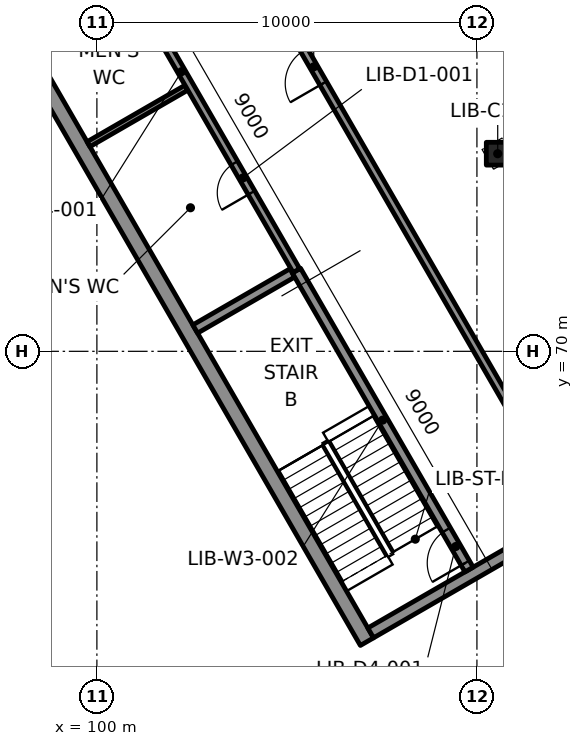
"""IFC4 building model, lengths in metres.
Left out: names, types, materials, properties, quantities, classifications, styles, units other than length and angle.
Written with IfcOpenShell. Run it as: python <this file> out.ifc"""

import sys

from ifc_helpers import new_model, si_unit, direction, frame, frame_2d, origin, origin_2d, place, context, subcontext, project, spatial, rectangle, extrude, element, fill, save


model = new_model("IFC4")
c1 = context("Model", 3, precision=1e-05, world=origin(), true_north=direction((0.0, 1.0)))
c2 = subcontext(c1, "Body", "Model", "MODEL_VIEW")
j1 = project(units=[si_unit("LENGTHUNIT", "METRE"), si_unit("PLANEANGLEUNIT", "RADIAN")], contexts=[c1])
p1 = place(None, origin())
s1 = spatial("IfcSite", under=j1, at=p1, CompositionType="ELEMENT")
p2 = place(p1, origin())
s2 = spatial("IfcBuilding", under=s1, at=p2, CompositionType="ELEMENT")
p3 = place(p2, frame((0.0, 0.0, 17.2)))
s3 = spatial("IfcBuildingStorey", under=s2, at=p3, CompositionType="ELEMENT", Elevation=17.2)
p4 = place(p3, frame((101.821, 68.315, -0.0), z_axis=(0.0, 0.0, 1.0), x_axis=(-0.5, 0.866025403784, 0.0)))
e1 = element("IfcColumn", 1, at=p4, inside=s3, PredefinedType="COLUMN", context=c2, shape_type="SweptSolid", body=[
    extrude(rectangle(XDim=1.2, YDim=1.5, at=origin_2d()), origin(), (0.0, 0.0, 1.0), 4.6),
])
p5 = place(p3, frame((103.019, 59.863, 0.0), z_axis=(0.0, 0.0, 1.0), x_axis=(-0.866027754727, 0.499995928025, 0.0)))
e2 = element("IfcWall", 2, at=p5, inside=s3, PredefinedType="PARTITIONING", context=c2, shape_type="SweptSolid", body=[
    extrude(rectangle(XDim=13.214, YDim=0.15, at=frame_2d((6.607, 0.0))), origin(), (0.0, 0.0, 1.0), 3.7),
])
p6 = place(p3, frame((110.547, 75.2, -0.36), z_axis=(0.0, 0.0, 1.0), x_axis=(1.0, 0.0, 0.0)))
e3 = element("IfcColumn", 3, at=p6, inside=s3, PredefinedType="COLUMN", context=c2, shape_type="SweptSolid", body=[
    extrude(rectangle(XDim=0.6, YDim=0.6, at=origin_2d()), origin(), (0.0, 0.0, 1.0), 4.6),
])
p7 = place(p3, frame((107.106, 62.36, 0.0), z_axis=(0.0, 0.0, 1.0), x_axis=(-0.49999992739, 0.866025445706, 0.0)))
e4 = element("IfcWall", 4, at=p7, inside=s3, PredefinedType="SOLIDWALL", context=c2, shape_type="SweptSolid", body=[
    extrude(rectangle(XDim=54.0, YDim=0.4, at=frame_2d((27.0, 0.0))), origin(), (0.0, 0.0, 1.0), 4.24),
])
p8 = place(p3, frame((132.784, 77.185, 0.0), z_axis=(0.0, 0.0, 1.0), x_axis=(-0.49999992739, 0.866025445706, 0.0)))
e5 = element("IfcWall", 5, at=p8, inside=s3, PredefinedType="SOLIDWALL", context=c2, shape_type="SweptSolid", body=[
    extrude(rectangle(XDim=54.0, YDim=0.3, at=frame_2d((27.0, 0.0))), origin(), (0.0, 0.0, 1.0), 4.24),
])
p9 = place(p8, frame((1.9, 0.0, 0.9)))
e6 = element("IfcOpeningElement", 6, at=p9, cuts=e5, PredefinedType="OPENING", context=c2, shape_type="SweptSolid", body=[
    extrude(rectangle(XDim=1.8, YDim=2.4, at=frame_2d((0.9, 1.2))), frame((0.0, 0.16, 0.0), z_axis=(0.0, -1.0, 0.0), x_axis=(1.0, 0.0, 0.0)), (0.0, 0.0, 1.0), 0.32),
])
p10 = place(p8, frame((6.3, 0.0, 0.9)))
e7 = element("IfcOpeningElement", 7, at=p10, cuts=e5, PredefinedType="OPENING", context=c2, shape_type="SweptSolid", body=[
    extrude(rectangle(XDim=1.8, YDim=2.4, at=frame_2d((0.9, 1.2))), frame((0.0, 0.16, 0.0), z_axis=(0.0, -1.0, 0.0), x_axis=(1.0, 0.0, 0.0)), (0.0, 0.0, 1.0), 0.32),
])
p11 = place(p8, frame((10.7, 0.0, 0.9)))
e8 = element("IfcOpeningElement", 8, at=p11, cuts=e5, PredefinedType="OPENING", context=c2, shape_type="SweptSolid", body=[
    extrude(rectangle(XDim=1.8, YDim=2.4, at=frame_2d((0.9, 1.2))), frame((0.0, 0.16, 0.0), z_axis=(0.0, -1.0, 0.0), x_axis=(1.0, 0.0, 0.0)), (0.0, 0.0, 1.0), 0.32),
])
p12 = place(p8, frame((15.1, 0.0, 0.9)))
e9 = element("IfcOpeningElement", 9, at=p12, cuts=e5, PredefinedType="OPENING", context=c2, shape_type="SweptSolid", body=[
    extrude(rectangle(XDim=1.8, YDim=2.4, at=frame_2d((0.9, 1.2))), frame((0.0, 0.16, 0.0), z_axis=(0.0, -1.0, 0.0), x_axis=(1.0, 0.0, 0.0)), (0.0, 0.0, 1.0), 0.32),
])
p13 = place(p8, frame((19.5, 0.0, 0.9)))
e10 = element("IfcOpeningElement", 10, at=p13, cuts=e5, PredefinedType="OPENING", context=c2, shape_type="SweptSolid", body=[
    extrude(rectangle(XDim=1.8, YDim=2.4, at=frame_2d((0.9, 1.2))), frame((0.0, 0.16, 0.0), z_axis=(0.0, -1.0, 0.0), x_axis=(1.0, 0.0, 0.0)), (0.0, 0.0, 1.0), 0.32),
])
p14 = place(p8, frame((23.9, 0.0, 0.9)))
e11 = element("IfcOpeningElement", 11, at=p14, cuts=e5, PredefinedType="OPENING", context=c2, shape_type="SweptSolid", body=[
    extrude(rectangle(XDim=1.8, YDim=2.4, at=frame_2d((0.9, 1.2))), frame((0.0, 0.16, 0.0), z_axis=(0.0, -1.0, 0.0), x_axis=(1.0, 0.0, 0.0)), (0.0, 0.0, 1.0), 0.32),
])
p15 = place(p8, frame((28.3, 0.0, 0.9)))
e12 = element("IfcOpeningElement", 12, at=p15, cuts=e5, PredefinedType="OPENING", context=c2, shape_type="SweptSolid", body=[
    extrude(rectangle(XDim=1.8, YDim=2.4, at=frame_2d((0.9, 1.2))), frame((0.0, 0.16, 0.0), z_axis=(0.0, -1.0, 0.0), x_axis=(1.0, 0.0, 0.0)), (0.0, 0.0, 1.0), 0.32),
])
p16 = place(p8, frame((32.7, 0.0, 0.9)))
e13 = element("IfcOpeningElement", 13, at=p16, cuts=e5, PredefinedType="OPENING", context=c2, shape_type="SweptSolid", body=[
    extrude(rectangle(XDim=1.8, YDim=2.4, at=frame_2d((0.9, 1.2))), frame((0.0, 0.16, 0.0), z_axis=(0.0, -1.0, 0.0), x_axis=(1.0, 0.0, 0.0)), (0.0, 0.0, 1.0), 0.32),
])
p17 = place(p8, frame((37.1, 0.0, 0.9)))
e14 = element("IfcOpeningElement", 14, at=p17, cuts=e5, PredefinedType="OPENING", context=c2, shape_type="SweptSolid", body=[
    extrude(rectangle(XDim=1.8, YDim=2.4, at=frame_2d((0.9, 1.2))), frame((0.0, 0.16, 0.0), z_axis=(0.0, -1.0, 0.0), x_axis=(1.0, 0.0, 0.0)), (0.0, 0.0, 1.0), 0.32),
])
p18 = place(p8, frame((50.3, 0.0, 0.9)))
e15 = element("IfcOpeningElement", 15, at=p18, cuts=e5, PredefinedType="OPENING", context=c2, shape_type="SweptSolid", body=[
    extrude(rectangle(XDim=1.8, YDim=2.4, at=frame_2d((0.9, 1.2))), frame((0.0, 0.16, 0.0), z_axis=(0.0, -1.0, 0.0), x_axis=(1.0, 0.0, 0.0)), (0.0, 0.0, 1.0), 0.32),
])
p19 = place(p3, frame((107.204, 62.59, 0.0), z_axis=(0.0, 0.0, 1.0), x_axis=(0.866045472092, 0.499965239061, 0.0)))
e16 = element("IfcWall", 16, at=p19, inside=s3, PredefinedType="SOLIDWALL", context=c2, shape_type="SweptSolid", body=[
    extrude(rectangle(XDim=5.6, YDim=0.3, at=frame_2d((2.8, 0.0))), origin(), (0.0, 0.0, 1.0), 4.24),
])
p20 = place(p3, frame((102.587, 70.587, 0.0), z_axis=(0.0, 0.0, 1.0), x_axis=(0.866039495442, 0.49997559174, 0.0)))
e17 = element("IfcWall", 17, at=p20, inside=s3, PredefinedType="SOLIDWALL", context=c2, shape_type="SweptSolid", body=[
    extrude(rectangle(XDim=2.95, YDim=0.25, at=frame_2d((1.475, 0.0))), origin(), (0.0, 0.0, 1.0), 4.24),
])
p21 = place(p3, frame((109.792, 64.257, 0.0), z_axis=(0.0, 0.0, 1.0), x_axis=(-0.499994616197, 0.866028512102, 0.0)))
e18 = element("IfcWall", 18, at=p21, inside=s3, PredefinedType="SOLIDWALL", context=c2, shape_type="SweptSolid", body=[
    extrude(rectangle(XDim=9.085, YDim=0.25, at=frame_2d((4.542, 0.0))), origin(), (0.0, 0.0, 1.0), 4.24),
])
p22 = place(p21, frame((0.2, 0.0, 0.0)))
e19 = element("IfcOpeningElement", 19, at=p22, cuts=e18, PredefinedType="OPENING", context=c2, shape_type="SweptSolid", body=[
    extrude(rectangle(XDim=1.0, YDim=2.1, at=frame_2d((0.5, 1.05))), frame((0.0, 0.135, 0.0), z_axis=(0.0, -1.0, 0.0), x_axis=(1.0, 0.0, 0.0)), (0.0, 0.0, 1.0), 0.27),
])
p23 = place(p3, frame((99.779, 75.45, 0.0), z_axis=(0.0, 0.0, 1.0), x_axis=(0.866017493347, 0.500013701029, 0.0)))
e20 = element("IfcWall", 20, at=p23, inside=s3, PredefinedType="PARTITIONING", context=c2, shape_type="SweptSolid", body=[
    extrude(rectangle(XDim=2.975, YDim=0.15, at=frame_2d((1.488, 0.0))), origin(), (0.0, 0.0, 1.0), 4.24),
])
p24 = place(p3, frame((105.25, 72.125, 0.0), z_axis=(0.0, 0.0, 1.0), x_axis=(-0.499996309931, 0.866027534236, 0.0)))
e21 = element("IfcWall", 21, at=p24, inside=s3, PredefinedType="PARTITIONING", context=c2, shape_type="SweptSolid", body=[
    extrude(rectangle(XDim=12.09, YDim=0.2, at=frame_2d((6.045, 0.0))), origin(), (0.0, 0.0, 1.0), 4.24),
])
p25 = place(p24, frame((2.365, 0.0, 0.0)))
e22 = element("IfcOpeningElement", 22, at=p25, cuts=e21, PredefinedType="OPENING", context=c2, shape_type="SweptSolid", body=[
    extrude(rectangle(XDim=0.9, YDim=2.1, at=frame_2d((0.45, 1.05))), frame((0.0, 0.11, 0.0), z_axis=(0.0, -1.0, 0.0), x_axis=(1.0, 0.0, 0.0)), (0.0, 0.0, 1.0), 0.22),
])
p26 = place(p24, frame((8.365, 0.0, 0.0)))
e23 = element("IfcOpeningElement", 23, at=p26, cuts=e21, PredefinedType="OPENING", context=c2, shape_type="SweptSolid", body=[
    extrude(rectangle(XDim=0.9, YDim=2.1, at=frame_2d((0.45, 1.05))), frame((0.0, 0.11, 0.0), z_axis=(0.0, -1.0, 0.0), x_axis=(1.0, 0.0, 0.0)), (0.0, 0.0, 1.0), 0.22),
])
p27 = place(p3, frame((112.496, 65.725, 0.0), z_axis=(0.0, 0.0, 1.0), x_axis=(-0.499998673217, 0.866026169802, 0.0)))
e24 = element("IfcWall", 24, at=p27, inside=s3, PredefinedType="PARTITIONING", context=c2, shape_type="SweptSolid", body=[
    extrude(rectangle(XDim=53.48, YDim=0.2, at=frame_2d((26.74, 0.0))), origin(), (0.0, 0.0, 1.0), 4.24),
])
p28 = place(p27, frame((13.08, 0.0, 0.0)))
e25 = element("IfcOpeningElement", 25, at=p28, cuts=e24, PredefinedType="OPENING", context=c2, shape_type="SweptSolid", body=[
    extrude(rectangle(XDim=1.0, YDim=2.1, at=frame_2d((0.5, 1.05))), frame((0.0, 0.11, 0.0), z_axis=(0.0, -1.0, 0.0), x_axis=(1.0, 0.0, 0.0)), (0.0, 0.0, 1.0), 0.22),
])
p29 = place(p27, frame((26.28, 0.0, 0.0)))
e26 = element("IfcOpeningElement", 26, at=p29, cuts=e24, PredefinedType="OPENING", context=c2, shape_type="SweptSolid", body=[
    extrude(rectangle(XDim=1.0, YDim=2.1, at=frame_2d((0.5, 1.05))), frame((0.0, 0.11, 0.0), z_axis=(0.0, -1.0, 0.0), x_axis=(1.0, 0.0, 0.0)), (0.0, 0.0, 1.0), 0.22),
])
p30 = place(p27, frame((43.88, 0.0, 0.0)))
e27 = element("IfcOpeningElement", 27, at=p30, cuts=e24, PredefinedType="OPENING", context=c2, shape_type="SweptSolid", body=[
    extrude(rectangle(XDim=1.0, YDim=2.1, at=frame_2d((0.5, 1.05))), frame((0.0, 0.11, 0.0), z_axis=(0.0, -1.0, 0.0), x_axis=(1.0, 0.0, 0.0)), (0.0, 0.0, 1.0), 0.22),
])
p31 = place(p27, frame((50.58, 0.0, 0.0)))
e28 = element("IfcOpeningElement", 28, at=p31, cuts=e24, PredefinedType="OPENING", context=c2, shape_type="SweptSolid", body=[
    extrude(rectangle(XDim=1.0, YDim=2.1, at=frame_2d((0.5, 1.05))), frame((0.0, 0.11, 0.0), z_axis=(0.0, -1.0, 0.0), x_axis=(1.0, 0.0, 0.0)), (0.0, 0.0, 1.0), 0.22),
])
p32 = place(p22, origin())
e29 = element("IfcDoor", 29, at=p32, inside=s3, OperationType="SINGLE_SWING_LEFT", PredefinedType="DOOR", context=c2, shape_type="SweptSolid", body=[
    extrude(rectangle(XDim=1.0, YDim=2.1, at=frame_2d((0.5, 1.05))), frame((0.0, 0.025, 0.0), z_axis=(0.0, -1.0, 0.0), x_axis=(1.0, 0.0, 0.0)), (0.0, 0.0, 1.0), 0.05),
])
fill(e19, e29)
p33 = place(p25, origin())
e30 = element("IfcDoor", 30, at=p33, inside=s3, OperationType="SINGLE_SWING_LEFT", PredefinedType="DOOR", context=c2, shape_type="SweptSolid", body=[
    extrude(rectangle(XDim=0.9, YDim=2.1, at=frame_2d((0.45, 1.05))), frame((0.0, 0.025, 0.0), z_axis=(0.0, -1.0, 0.0), x_axis=(1.0, 0.0, 0.0)), (0.0, 0.0, 1.0), 0.05),
])
fill(e22, e30)
p34 = place(p28, origin())
e31 = element("IfcDoor", 31, at=p34, inside=s3, OperationType="SINGLE_SWING_LEFT", PredefinedType="DOOR", context=c2, shape_type="SweptSolid", body=[
    extrude(rectangle(XDim=1.0, YDim=2.1, at=frame_2d((0.5, 1.05))), frame((0.0, 0.025, 0.0), z_axis=(0.0, -1.0, 0.0), x_axis=(1.0, 0.0, 0.0)), (0.0, 0.0, 1.0), 0.05),
])
fill(e25, e31)
save(model, sys.argv[1])
